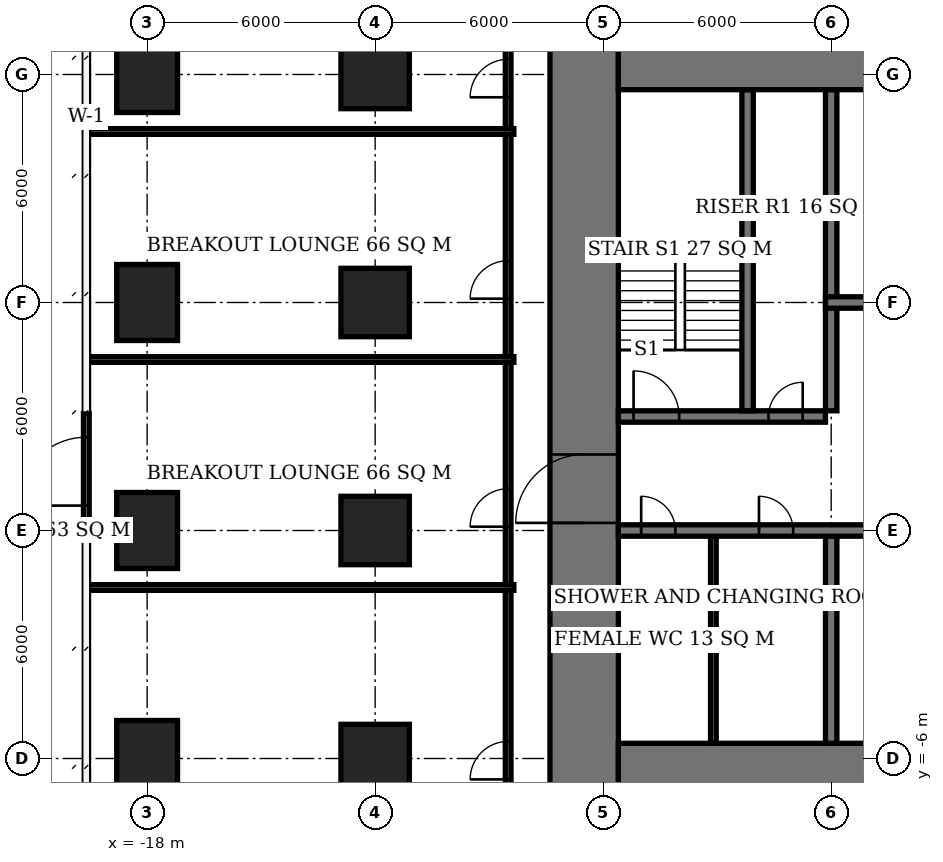
"""IFC4 building model, lengths in metres.
Left out: names, types, materials, properties, quantities, classifications, styles, units other than length and angle.
Written with IfcOpenShell. Run it as: python <this file> out.ifc"""

import sys

from ifc_helpers import new_model, si_unit, direction, frame, frame_2d, origin, origin_2d, place, context, subcontext, project, spatial, rectangle, extrude, element, fill, save


model = new_model("IFC4")
c1 = context("Model", 3, precision=1e-05, world=origin(), true_north=direction((0.0, 1.0)))
c2 = subcontext(c1, "Body", "Model", "MODEL_VIEW")
j1 = project(units=[si_unit("LENGTHUNIT", "METRE"), si_unit("PLANEANGLEUNIT", "RADIAN")], contexts=[c1])
p1 = place(None, origin())
s1 = spatial("IfcSite", under=j1, at=p1, CompositionType="ELEMENT")
p2 = place(p1, origin())
s2 = spatial("IfcBuilding", under=s1, at=p2, CompositionType="ELEMENT")
p3 = place(p2, frame((0.0, 0.0, 41.6)))
s3 = spatial("IfcBuildingStorey", under=s2, at=p3, CompositionType="ELEMENT", Elevation=41.6)
for number, where, z_axis, x_axis in (
    (1, (-18.0, -6.0, 0.0), (0.0, 0.0, 1.0), (0.0, 1.0, 0.0)),
    (2, (-18.0, 0.0, 0.0), (0.0, 0.0, 1.0), (0.0, 1.0, 0.0)),
    (3, (-18.0, 6.0, 0.0), (0.0, 0.0, 1.0), (0.0, 1.0, 0.0)),
    (4, (-18.0, 12.0, 0.0), (0.0, 0.0, 1.0), (0.0, 1.0, 0.0)),
):
    element("IfcColumn", number, at=place(p3, frame(where, z_axis=z_axis, x_axis=x_axis)), inside=s3, PredefinedType="COLUMN", context=c2, shape_type="SweptSolid", body=[
        extrude(rectangle(XDim=2.0, YDim=1.6, at=origin_2d()), origin(), (0.0, 0.0, 1.0), 3.9),
    ])
for number, where, z_axis, x_axis in (
    (5, (-12.0, -6.0, 0.0), (0.0, 0.0, 1.0), (1.0, 0.0, 0.0)),
    (6, (-12.0, 0.0, 0.0), (0.0, 0.0, 1.0), (1.0, 0.0, 0.0)),
    (7, (-12.0, 6.0, 0.0), (0.0, 0.0, 1.0), (1.0, 0.0, 0.0)),
    (8, (-12.0, 12.0, 0.0), (0.0, 0.0, 1.0), (1.0, 0.0, 0.0)),
):
    element("IfcColumn", number, at=place(p3, frame(where, z_axis=z_axis, x_axis=x_axis)), inside=s3, PredefinedType="COLUMN", context=c2, shape_type="SweptSolid", body=[
        extrude(rectangle(XDim=1.8, YDim=1.8, at=origin_2d()), origin(), (0.0, 0.0, 1.0), 3.9),
    ])
for number, where, z_axis, x_axis in (
    (9, (-5.6, -6.6, 0.0), (0.0, 0.0, 1.0), (1.0, 0.0, 0.0)),
    (10, (-5.6, 12.6, 0.0), (0.0, 0.0, 1.0), (1.0, 0.0, 0.0)),
):
    element("IfcWall", number, at=place(p3, frame(where, z_axis=z_axis, x_axis=x_axis)), inside=s3, PredefinedType="SHEAR", context=c2, shape_type="SweptSolid", body=[
        extrude(rectangle(XDim=23.2, YDim=2.0, at=frame_2d((11.6, 0.0))), origin(), (0.0, 0.0, 1.0), 3.9),
    ])
p4 = place(p3, frame((-6.5, -7.6, 0.0), z_axis=(0.0, 0.0, 1.0), x_axis=(0.0, 1.0, 0.0)))
e11 = element("IfcWall", 11, at=p4, inside=s3, PredefinedType="SHEAR", context=c2, shape_type="SweptSolid", body=[
    extrude(rectangle(XDim=21.2, YDim=1.8, at=frame_2d((10.6, 0.0))), origin(), (0.0, 0.0, 1.0), 3.9),
])
p5 = place(p4, frame((7.8, 0.0, 0.0)))
e12 = element("IfcOpeningElement", 12, at=p5, cuts=e11, PredefinedType="OPENING", context=c2, shape_type="SweptSolid", body=[
    extrude(rectangle(XDim=1.8, YDim=2.4, at=frame_2d((0.9, 1.2))), frame((0.0, 0.91, 0.0), z_axis=(0.0, -1.0, 0.0), x_axis=(1.0, 0.0, 0.0)), (0.0, 0.0, 1.0), 1.82),
])
p6 = place(p3, frame((-5.6, 0.0, 0.0), z_axis=(0.0, 0.0, 1.0), x_axis=(1.0, 0.0, 0.0)))
e13 = element("IfcWall", 13, at=p6, inside=s3, PredefinedType="SHEAR", context=c2, shape_type="SweptSolid", body=[
    extrude(rectangle(XDim=17.75, YDim=0.3, at=frame_2d((8.875, 0.0))), origin(), (0.0, 0.0, 1.0), 3.9),
])
p7 = place(p6, frame((0.6, 0.0, 0.0)))
e14 = element("IfcOpeningElement", 14, at=p7, cuts=e13, PredefinedType="OPENING", context=c2, shape_type="SweptSolid", body=[
    extrude(rectangle(XDim=0.9, YDim=2.1, at=frame_2d((0.45, 1.05))), frame((0.0, 0.16, 0.0), z_axis=(0.0, -1.0, 0.0), x_axis=(1.0, 0.0, 0.0)), (0.0, 0.0, 1.0), 0.32),
])
p8 = place(p6, frame((3.7, 0.0, 0.0)))
e15 = element("IfcOpeningElement", 15, at=p8, cuts=e13, PredefinedType="OPENING", context=c2, shape_type="SweptSolid", body=[
    extrude(rectangle(XDim=0.9, YDim=2.1, at=frame_2d((0.45, 1.05))), frame((0.0, 0.16, 0.0), z_axis=(0.0, -1.0, 0.0), x_axis=(1.0, 0.0, 0.0)), (0.0, 0.0, 1.0), 0.32),
])
p9 = place(p3, frame((-5.6, 3.0, 0.0), z_axis=(0.0, 0.0, 1.0), x_axis=(1.0, 0.0, 0.0)))
e16 = element("IfcWall", 16, at=p9, inside=s3, PredefinedType="SHEAR", context=c2, shape_type="SweptSolid", body=[
    extrude(rectangle(XDim=5.45, YDim=0.3, at=frame_2d((2.725, 0.0))), origin(), (0.0, 0.0, 1.0), 3.9),
])
p10 = place(p9, frame((0.4, 0.0, 0.0)))
e17 = element("IfcOpeningElement", 17, at=p10, cuts=e16, PredefinedType="OPENING", context=c2, shape_type="SweptSolid", body=[
    extrude(rectangle(XDim=1.2, YDim=2.1, at=frame_2d((0.6, 1.05))), frame((0.0, 0.16, 0.0), z_axis=(0.0, -1.0, 0.0), x_axis=(1.0, 0.0, 0.0)), (0.0, 0.0, 1.0), 0.32),
])
p11 = place(p9, frame((3.95, 0.0, 0.0)))
e18 = element("IfcOpeningElement", 18, at=p11, cuts=e16, PredefinedType="OPENING", context=c2, shape_type="SweptSolid", body=[
    extrude(rectangle(XDim=0.9, YDim=2.1, at=frame_2d((0.45, 1.05))), frame((0.0, 0.16, 0.0), z_axis=(0.0, -1.0, 0.0), x_axis=(1.0, 0.0, 0.0)), (0.0, 0.0, 1.0), 0.32),
])
p12 = place(p3, frame((-0.15, 6.0, 0.0), z_axis=(0.0, 0.0, 1.0), x_axis=(1.0, 0.0, 0.0)))
e19 = element("IfcWall", 19, at=p12, inside=s3, PredefinedType="SHEAR", context=c2, shape_type="SweptSolid", body=[
    extrude(rectangle(XDim=17.75, YDim=0.3, at=frame_2d((8.875, 0.0))), origin(), (0.0, 0.0, 1.0), 3.9),
])
p13 = place(p12, frame((13.15, 0.0, 0.0)))
e20 = element("IfcOpeningElement", 20, at=p13, cuts=e19, PredefinedType="OPENING", context=c2, shape_type="SweptSolid", body=[
    extrude(rectangle(XDim=0.9, YDim=2.1, at=frame_2d((0.45, 1.05))), frame((0.0, 0.16, 0.0), z_axis=(0.0, -1.0, 0.0), x_axis=(1.0, 0.0, 0.0)), (0.0, 0.0, 1.0), 0.32),
])
p14 = place(p12, frame((16.25, 0.0, 0.0)))
e21 = element("IfcOpeningElement", 21, at=p14, cuts=e19, PredefinedType="OPENING", context=c2, shape_type="SweptSolid", body=[
    extrude(rectangle(XDim=1.0, YDim=2.1, at=frame_2d((0.5, 1.05))), frame((0.0, 0.16, 0.0), z_axis=(0.0, -1.0, 0.0), x_axis=(1.0, 0.0, 0.0)), (0.0, 0.0, 1.0), 0.32),
])
p15 = place(p12, frame((1.1, 0.0, 0.0)))
e22 = element("IfcOpeningElement", 22, at=p15, cuts=e19, PredefinedType="OPENING", context=c2, shape_type="SweptSolid", body=[
    extrude(rectangle(XDim=1.1, YDim=2.1, at=frame_2d((0.55, 1.05))), frame((0.0, 0.16, 0.0), z_axis=(0.0, -1.0, 0.0), x_axis=(1.0, 0.0, 0.0)), (0.0, 0.0, 1.0), 0.32),
])
p16 = place(p12, frame((4.1, 0.0, 0.0)))
e23 = element("IfcOpeningElement", 23, at=p16, cuts=e19, PredefinedType="OPENING", context=c2, shape_type="SweptSolid", body=[
    extrude(rectangle(XDim=1.1, YDim=2.1, at=frame_2d((0.55, 1.05))), frame((0.0, 0.16, 0.0), z_axis=(0.0, -1.0, 0.0), x_axis=(1.0, 0.0, 0.0)), (0.0, 0.0, 1.0), 0.32),
])
p17 = place(p12, frame((7.1, 0.0, 0.0)))
e24 = element("IfcOpeningElement", 24, at=p17, cuts=e19, PredefinedType="OPENING", context=c2, shape_type="SweptSolid", body=[
    extrude(rectangle(XDim=1.1, YDim=2.1, at=frame_2d((0.55, 1.05))), frame((0.0, 0.16, 0.0), z_axis=(0.0, -1.0, 0.0), x_axis=(1.0, 0.0, 0.0)), (0.0, 0.0, 1.0), 0.32),
])
p18 = place(p12, frame((10.1, 0.0, 0.0)))
e25 = element("IfcOpeningElement", 25, at=p18, cuts=e19, PredefinedType="OPENING", context=c2, shape_type="SweptSolid", body=[
    extrude(rectangle(XDim=1.1, YDim=2.1, at=frame_2d((0.55, 1.05))), frame((0.0, 0.16, 0.0), z_axis=(0.0, -1.0, 0.0), x_axis=(1.0, 0.0, 0.0)), (0.0, 0.0, 1.0), 0.32),
])
p19 = place(p3, frame((0.0, -5.6, 0.0), z_axis=(0.0, 0.0, 1.0), x_axis=(0.0, 1.0, 0.0)))
e26 = element("IfcWall", 26, at=p19, inside=s3, PredefinedType="SHEAR", context=c2, shape_type="SweptSolid", body=[
    extrude(rectangle(XDim=5.45, YDim=0.3, at=frame_2d((2.725, 0.0))), origin(), (0.0, 0.0, 1.0), 3.9),
])
for number, where, z_axis, x_axis in (
    (27, (0.0, 3.15, 0.0), (0.0, 0.0, 1.0), (0.0, 1.0, 0.0)),
    (28, (-2.2, 3.15, 0.0), (0.0, 0.0, 1.0), (0.0, 1.0, 0.0)),
):
    element("IfcWall", number, at=place(p3, frame(where, z_axis=z_axis, x_axis=x_axis)), inside=s3, PredefinedType="SHEAR", context=c2, shape_type="SweptSolid", body=[
        extrude(rectangle(XDim=8.45, YDim=0.3, at=frame_2d((4.225, 0.0))), origin(), (0.0, 0.0, 1.0), 3.9),
    ])
p20 = place(p3, frame((-19.6, -0.042, 0.0), z_axis=(0.0, 0.0, 1.0), x_axis=(0.0, 1.0, 0.0)))
e29 = element("IfcWall", 29, at=p20, inside=s3, PredefinedType="USERDEFINED", context=c2, shape_type="SweptSolid", body=[
    extrude(rectangle(XDim=3.12, YDim=0.15, at=frame_2d((1.56, 0.0))), origin(), (0.0, 0.0, 1.0), 3.9),
])
p21 = place(p20, frame((0.698, 0.0, 0.0)))
e30 = element("IfcOpeningElement", 30, at=p21, cuts=e29, PredefinedType="OPENING", context=c2, shape_type="SweptSolid", body=[
    extrude(rectangle(XDim=1.8, YDim=2.4, at=frame_2d((0.9, 1.2))), frame((0.0, 0.085, 0.0), z_axis=(0.0, -1.0, 0.0), x_axis=(1.0, 0.0, 0.0)), (0.0, 0.0, 1.0), 0.17),
])
p22 = place(p3, frame((-3.1, -5.6, 0.0), z_axis=(0.0, 0.0, 1.0), x_axis=(0.0, 1.0, 0.0)))
e31 = element("IfcWall", 31, at=p22, inside=s3, PredefinedType="PLUMBINGWALL", context=c2, shape_type="SweptSolid", body=[
    extrude(rectangle(XDim=5.45, YDim=0.15, at=frame_2d((2.725, 0.0))), origin(), (0.0, 0.0, 1.0), 3.65),
])
for number, where, z_axis, x_axis in (
    (32, (-19.6, -1.5, 0.0), (0.0, 0.0, 1.0), (1.0, 0.0, 0.0)),
    (33, (-19.6, 4.5, 0.0), (0.0, 0.0, 1.0), (1.0, 0.0, 0.0)),
    (34, (-19.6, 10.5, 0.0), (0.0, 0.0, 1.0), (1.0, 0.0, 0.0)),
):
    element("IfcWall", number, at=place(p3, frame(where, z_axis=z_axis, x_axis=x_axis)), inside=s3, PredefinedType="PARTITIONING", context=c2, shape_type="SweptSolid", body=[
        extrude(rectangle(XDim=11.25, YDim=0.15, at=frame_2d((5.625, 0.0))), origin(), (0.0, 0.0, 1.0), 3.65),
    ])
p23 = place(p3, frame((-8.5, -8.425, 0.0), z_axis=(0.0, 0.0, 1.0), x_axis=(0.0, 1.0, 0.0)))
e35 = element("IfcWall", 35, at=p23, inside=s3, PredefinedType="PARTITIONING", context=c2, shape_type="SweptSolid", body=[
    extrude(rectangle(XDim=6.85, YDim=0.15, at=frame_2d((3.425, 0.0))), origin(), (0.0, 0.0, 1.0), 3.65),
])
p24 = place(p23, frame((1.875, 0.0, 0.0)))
e36 = element("IfcOpeningElement", 36, at=p24, cuts=e35, PredefinedType="OPENING", context=c2, shape_type="SweptSolid", body=[
    extrude(rectangle(XDim=1.0, YDim=2.1, at=frame_2d((0.5, 1.05))), frame((0.0, 0.085, 0.0), z_axis=(0.0, -1.0, 0.0), x_axis=(1.0, 0.0, 0.0)), (0.0, 0.0, 1.0), 0.17),
])
p25 = place(p3, frame((-8.5, -1.425, 0.0), z_axis=(0.0, 0.0, 1.0), x_axis=(0.0, 1.0, 0.0)))
e37 = element("IfcWall", 37, at=p25, inside=s3, PredefinedType="PARTITIONING", context=c2, shape_type="SweptSolid", body=[
    extrude(rectangle(XDim=5.85, YDim=0.15, at=frame_2d((2.925, 0.0))), origin(), (0.0, 0.0, 1.0), 3.65),
])
p26 = place(p25, frame((1.525, 0.0, 0.0)))
e38 = element("IfcOpeningElement", 38, at=p26, cuts=e37, PredefinedType="OPENING", context=c2, shape_type="SweptSolid", body=[
    extrude(rectangle(XDim=1.0, YDim=2.1, at=frame_2d((0.5, 1.05))), frame((0.0, 0.085, 0.0), z_axis=(0.0, -1.0, 0.0), x_axis=(1.0, 0.0, 0.0)), (0.0, 0.0, 1.0), 0.17),
])
p27 = place(p3, frame((-8.5, 4.575, 0.0), z_axis=(0.0, 0.0, 1.0), x_axis=(0.0, 1.0, 0.0)))
e39 = element("IfcWall", 39, at=p27, inside=s3, PredefinedType="PARTITIONING", context=c2, shape_type="SweptSolid", body=[
    extrude(rectangle(XDim=5.85, YDim=0.15, at=frame_2d((2.925, 0.0))), origin(), (0.0, 0.0, 1.0), 3.65),
])
p28 = place(p27, frame((1.525, 0.0, 0.0)))
e40 = element("IfcOpeningElement", 40, at=p28, cuts=e39, PredefinedType="OPENING", context=c2, shape_type="SweptSolid", body=[
    extrude(rectangle(XDim=1.0, YDim=2.1, at=frame_2d((0.5, 1.05))), frame((0.0, 0.085, 0.0), z_axis=(0.0, -1.0, 0.0), x_axis=(1.0, 0.0, 0.0)), (0.0, 0.0, 1.0), 0.17),
])
p29 = place(p3, frame((-8.5, 10.575, 0.0), z_axis=(0.0, 0.0, 1.0), x_axis=(0.0, 1.0, 0.0)))
e41 = element("IfcWall", 41, at=p29, inside=s3, PredefinedType="PARTITIONING", context=c2, shape_type="SweptSolid", body=[
    extrude(rectangle(XDim=3.85, YDim=0.15, at=frame_2d((1.925, 0.0))), origin(), (0.0, 0.0, 1.0), 3.65),
])
p30 = place(p29, frame((0.825, 0.0, 0.0)))
e42 = element("IfcOpeningElement", 42, at=p30, cuts=e41, PredefinedType="OPENING", context=c2, shape_type="SweptSolid", body=[
    extrude(rectangle(XDim=1.0, YDim=2.1, at=frame_2d((0.5, 1.05))), frame((0.0, 0.085, 0.0), z_axis=(0.0, -1.0, 0.0), x_axis=(1.0, 0.0, 0.0)), (0.0, 0.0, 1.0), 0.17),
])
p31 = place(p21, origin())
e43 = element("IfcDoor", 43, at=p31, inside=s3, OperationType="DOUBLE_DOOR_SINGLE_SWING", PredefinedType="DOOR", context=c2, shape_type="SweptSolid", body=[
    extrude(rectangle(XDim=1.8, YDim=2.4, at=frame_2d((0.9, 1.2))), frame((0.0, 0.025, 0.0), z_axis=(0.0, -1.0, 0.0), x_axis=(1.0, 0.0, 0.0)), (0.0, 0.0, 1.0), 0.05),
])
fill(e30, e43)
p32 = place(p5, origin())
e44 = element("IfcDoor", 44, at=p32, inside=s3, OperationType="DOUBLE_DOOR_SINGLE_SWING", PredefinedType="DOOR", context=c2, shape_type="SweptSolid", body=[
    extrude(rectangle(XDim=1.8, YDim=2.4, at=frame_2d((0.9, 1.2))), frame((0.0, 0.025, 0.0), z_axis=(0.0, -1.0, 0.0), x_axis=(1.0, 0.0, 0.0)), (0.0, 0.0, 1.0), 0.05),
])
fill(e12, e44)
p33 = place(p10, origin())
e45 = element("IfcDoor", 45, at=p33, inside=s3, OperationType="SINGLE_SWING_LEFT", PredefinedType="DOOR", context=c2, shape_type="SweptSolid", body=[
    extrude(rectangle(XDim=1.2, YDim=2.1, at=frame_2d((0.6, 1.05))), frame((0.0, 0.025, 0.0), z_axis=(0.0, -1.0, 0.0), x_axis=(1.0, 0.0, 0.0)), (0.0, 0.0, 1.0), 0.05),
])
fill(e17, e45)
p34 = place(p11, origin())
e46 = element("IfcDoor", 46, at=p34, inside=s3, OperationType="SINGLE_SWING_RIGHT", PredefinedType="DOOR", context=c2, shape_type="SweptSolid", body=[
    extrude(rectangle(XDim=0.9, YDim=2.1, at=frame_2d((0.45, 1.05))), frame((0.0, 0.025, 0.0), z_axis=(0.0, -1.0, 0.0), x_axis=(1.0, 0.0, 0.0)), (0.0, 0.0, 1.0), 0.05),
])
fill(e18, e46)
p35 = place(p7, origin())
e47 = element("IfcDoor", 47, at=p35, inside=s3, OperationType="SINGLE_SWING_LEFT", PredefinedType="DOOR", context=c2, shape_type="SweptSolid", body=[
    extrude(rectangle(XDim=0.9, YDim=2.1, at=frame_2d((0.45, 1.05))), frame((0.0, 0.025, 0.0), z_axis=(0.0, -1.0, 0.0), x_axis=(1.0, 0.0, 0.0)), (0.0, 0.0, 1.0), 0.05),
])
fill(e14, e47)
p36 = place(p8, origin())
e48 = element("IfcDoor", 48, at=p36, inside=s3, OperationType="SINGLE_SWING_LEFT", PredefinedType="DOOR", context=c2, shape_type="SweptSolid", body=[
    extrude(rectangle(XDim=0.9, YDim=2.1, at=frame_2d((0.45, 1.05))), frame((0.0, 0.025, 0.0), z_axis=(0.0, -1.0, 0.0), x_axis=(1.0, 0.0, 0.0)), (0.0, 0.0, 1.0), 0.05),
])
fill(e15, e48)
p37 = place(p24, origin())
e49 = element("IfcDoor", 49, at=p37, inside=s3, OperationType="SINGLE_SWING_LEFT", PredefinedType="DOOR", context=c2, shape_type="SweptSolid", body=[
    extrude(rectangle(XDim=1.0, YDim=2.1, at=frame_2d((0.5, 1.05))), frame((0.0, 0.025, 0.0), z_axis=(0.0, -1.0, 0.0), x_axis=(1.0, 0.0, 0.0)), (0.0, 0.0, 1.0), 0.05),
])
fill(e36, e49)
p38 = place(p26, origin())
e50 = element("IfcDoor", 50, at=p38, inside=s3, OperationType="SINGLE_SWING_LEFT", PredefinedType="DOOR", context=c2, shape_type="SweptSolid", body=[
    extrude(rectangle(XDim=1.0, YDim=2.1, at=frame_2d((0.5, 1.05))), frame((0.0, 0.025, 0.0), z_axis=(0.0, -1.0, 0.0), x_axis=(1.0, 0.0, 0.0)), (0.0, 0.0, 1.0), 0.05),
])
fill(e38, e50)
p39 = place(p28, origin())
e51 = element("IfcDoor", 51, at=p39, inside=s3, OperationType="SINGLE_SWING_LEFT", PredefinedType="DOOR", context=c2, shape_type="SweptSolid", body=[
    extrude(rectangle(XDim=1.0, YDim=2.1, at=frame_2d((0.5, 1.05))), frame((0.0, 0.025, 0.0), z_axis=(0.0, -1.0, 0.0), x_axis=(1.0, 0.0, 0.0)), (0.0, 0.0, 1.0), 0.05),
])
fill(e40, e51)
p40 = place(p30, origin())
e52 = element("IfcDoor", 52, at=p40, inside=s3, OperationType="SINGLE_SWING_LEFT", PredefinedType="DOOR", context=c2, shape_type="SweptSolid", body=[
    extrude(rectangle(XDim=1.0, YDim=2.1, at=frame_2d((0.5, 1.05))), frame((0.0, 0.025, 0.0), z_axis=(0.0, -1.0, 0.0), x_axis=(1.0, 0.0, 0.0)), (0.0, 0.0, 1.0), 0.05),
])
fill(e42, e52)
save(model, sys.argv[1])
